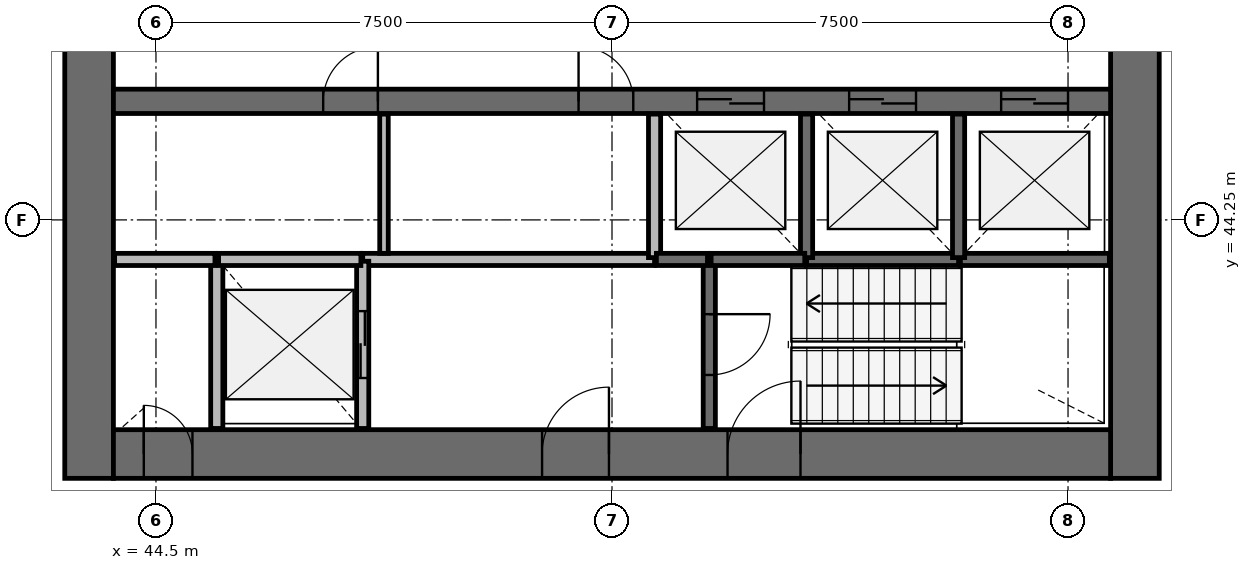
"""IFC4 building model, lengths in metres.
Left out: names, types, materials, properties, quantities, classifications, styles, units other than length and angle.
Written with IfcOpenShell. Run it as: python <this file> out.ifc"""

import sys

from ifc_helpers import new_model, si_unit, direction, frame, frame_2d, origin, place, context, subcontext, project, spatial, rectangle, extrude, source, transform, mapped, element, fill, save


model = new_model("IFC4")
c1 = context("Model", 3, precision=1e-05, world=origin(), true_north=direction((0.0, 1.0)))
c2 = subcontext(c1, "Body", "Model", "MODEL_VIEW")
j1 = project(units=[si_unit("LENGTHUNIT", "METRE"), si_unit("PLANEANGLEUNIT", "RADIAN")], contexts=[c1])
p1 = place(None, origin())
s1 = spatial("IfcSite", under=j1, at=p1, CompositionType="ELEMENT")
p2 = place(p1, origin())
s2 = spatial("IfcBuilding", under=s1, at=p2, CompositionType="ELEMENT")
p3 = place(p2, frame((0.0, 0.0, 144.8)))
s3 = spatial("IfcBuildingStorey", under=s2, at=p3, CompositionType="ELEMENT", Elevation=144.8)
p4 = place(p3, frame((60.6, 40.0, 0.0), z_axis=(0.0, 0.0, 1.0), x_axis=(0.0, 1.0, 0.0)))
e1 = element("IfcWall", 1, at=p4, inside=s3, PredefinedType="SHEAR", context=c2, shape_type="SweptSolid", body=[
    extrude(rectangle(XDim=16.0, YDim=0.8, at=frame_2d((8.0, 0.0))), origin(), (0.0, 0.0, 1.0), 3.9),
])
p5 = place(p4, frame((7.1, 0.0, 0.0)))
e2 = element("IfcOpeningElement", 2, at=p5, cuts=e1, PredefinedType="OPENING", context=c2, shape_type="SweptSolid", body=[
    extrude(rectangle(XDim=1.8, YDim=2.1, at=frame_2d((0.9, 1.05))), frame((0.0, 0.41, 0.0), z_axis=(0.0, -1.0, 0.0), x_axis=(1.0, 0.0, 0.0)), (0.0, 0.0, 1.0), 0.82),
])
p6 = place(p3, frame((43.4, 56.0, 0.0), z_axis=(0.0, 0.0, 1.0), x_axis=(0.0, -1.0, 0.0)))
e3 = element("IfcWall", 3, at=p6, inside=s3, PredefinedType="SHEAR", context=c2, shape_type="SweptSolid", body=[
    extrude(rectangle(XDim=16.0, YDim=0.8, at=frame_2d((8.0, 0.0))), origin(), (0.0, 0.0, 1.0), 3.9),
])
p7 = place(p6, frame((7.1, 0.0, 0.0)))
e4 = element("IfcOpeningElement", 4, at=p7, cuts=e3, PredefinedType="OPENING", context=c2, shape_type="SweptSolid", body=[
    extrude(rectangle(XDim=1.8, YDim=2.1, at=frame_2d((0.9, 1.05))), frame((0.0, 0.41, 0.0), z_axis=(0.0, -1.0, 0.0), x_axis=(1.0, 0.0, 0.0)), (0.0, 0.0, 1.0), 0.82),
])
p8 = place(p3, frame((43.8, 40.4, 0.0), z_axis=(0.0, 0.0, 1.0), x_axis=(1.0, 0.0, 0.0)))
e5 = element("IfcWall", 5, at=p8, inside=s3, PredefinedType="SHEAR", context=c2, shape_type="SweptSolid", body=[
    extrude(rectangle(XDim=16.4, YDim=0.8, at=frame_2d((8.2, 0.0))), origin(), (0.0, 0.0, 1.0), 3.9),
])
p9 = place(p8, frame((10.1, 0.0, 0.0)))
e6 = element("IfcOpeningElement", 6, at=p9, cuts=e5, PredefinedType="OPENING", context=c2, shape_type="SweptSolid", body=[
    extrude(rectangle(XDim=1.2, YDim=2.1, at=frame_2d((0.6, 1.05))), frame((0.0, 0.41, 0.0), z_axis=(0.0, -1.0, 0.0), x_axis=(1.0, 0.0, 0.0)), (0.0, 0.0, 1.0), 0.82),
])
p10 = place(p8, frame((7.05, 0.0, 0.0)))
e7 = element("IfcOpeningElement", 7, at=p10, cuts=e5, PredefinedType="OPENING", context=c2, shape_type="SweptSolid", body=[
    extrude(rectangle(XDim=1.1, YDim=2.1, at=frame_2d((0.55, 1.05))), frame((0.0, 0.41, 0.0), z_axis=(0.0, -1.0, 0.0), x_axis=(1.0, 0.0, 0.0)), (0.0, 0.0, 1.0), 0.82),
])
p11 = place(p8, frame((0.5, 0.0, 0.0)))
e8 = element("IfcOpeningElement", 8, at=p11, cuts=e5, PredefinedType="OPENING", context=c2, shape_type="SweptSolid", body=[
    extrude(rectangle(XDim=0.8, YDim=2.1, at=frame_2d((0.4, 1.05))), frame((0.0, 0.41, 0.0), z_axis=(0.0, -1.0, 0.0), x_axis=(1.0, 0.0, 0.0)), (0.0, 0.0, 1.0), 0.82),
])
p12 = place(p3, frame((43.8, 46.2, 0.0), z_axis=(0.0, 0.0, 1.0), x_axis=(1.0, 0.0, 0.0)))
e9 = element("IfcWall", 9, at=p12, inside=s3, PredefinedType="SHEAR", context=c2, shape_type="SweptSolid", body=[
    extrude(rectangle(XDim=16.4, YDim=0.4, at=frame_2d((8.2, 0.0))), origin(), (0.0, 0.0, 1.0), 3.9),
])
p13 = place(p12, frame((9.6, 0.0, 0.0)))
e10 = element("IfcOpeningElement", 10, at=p13, cuts=e9, PredefinedType="OPENING", context=c2, shape_type="SweptSolid", body=[
    extrude(rectangle(XDim=1.1, YDim=2.1, at=frame_2d((0.55, 1.05))), frame((0.0, 0.21, 0.0), z_axis=(0.0, -1.0, 0.0), x_axis=(1.0, 0.0, 0.0)), (0.0, 0.0, 1.0), 0.42),
])
p14 = place(p12, frame((12.1, 0.0, 0.0)))
e11 = element("IfcOpeningElement", 11, at=p14, cuts=e9, PredefinedType="OPENING", context=c2, shape_type="SweptSolid", body=[
    extrude(rectangle(XDim=1.1, YDim=2.1, at=frame_2d((0.55, 1.05))), frame((0.0, 0.21, 0.0), z_axis=(0.0, -1.0, 0.0), x_axis=(1.0, 0.0, 0.0)), (0.0, 0.0, 1.0), 0.42),
])
p15 = place(p12, frame((14.6, 0.0, 0.0)))
e12 = element("IfcOpeningElement", 12, at=p15, cuts=e9, PredefinedType="OPENING", context=c2, shape_type="SweptSolid", body=[
    extrude(rectangle(XDim=1.1, YDim=2.1, at=frame_2d((0.55, 1.05))), frame((0.0, 0.21, 0.0), z_axis=(0.0, -1.0, 0.0), x_axis=(1.0, 0.0, 0.0)), (0.0, 0.0, 1.0), 0.42),
])
p16 = place(p12, frame((3.45, 0.0, 0.0)))
e13 = element("IfcOpeningElement", 13, at=p16, cuts=e9, PredefinedType="OPENING", context=c2, shape_type="SweptSolid", body=[
    extrude(rectangle(XDim=0.9, YDim=2.1, at=frame_2d((0.45, 1.05))), frame((0.0, 0.21, 0.0), z_axis=(0.0, -1.0, 0.0), x_axis=(1.0, 0.0, 0.0)), (0.0, 0.0, 1.0), 0.42),
])
p17 = place(p12, frame((7.65, 0.0, 0.0)))
e14 = element("IfcOpeningElement", 14, at=p17, cuts=e9, PredefinedType="OPENING", context=c2, shape_type="SweptSolid", body=[
    extrude(rectangle(XDim=0.9, YDim=2.1, at=frame_2d((0.45, 1.05))), frame((0.0, 0.21, 0.0), z_axis=(0.0, -1.0, 0.0), x_axis=(1.0, 0.0, 0.0)), (0.0, 0.0, 1.0), 0.42),
])
p18 = place(p3, frame((52.7, 43.6, 0.0), z_axis=(0.0, 0.0, 1.0), x_axis=(-1.0, 0.0, 0.0)))
e15 = element("IfcWall", 15, at=p18, inside=s3, PredefinedType="SOLIDWALL", context=c2, shape_type="SweptSolid", body=[
    extrude(rectangle(XDim=4.8, YDim=0.2, at=frame_2d((2.4, 0.0))), origin(), (0.0, 0.0, 1.0), 3.58),
])
p19 = place(p3, frame((45.5, 43.6, 0.0), z_axis=(0.0, 0.0, 1.0), x_axis=(0.0, -1.0, 0.0)))
e16 = element("IfcWall", 16, at=p19, inside=s3, PredefinedType="SOLIDWALL", context=c2, shape_type="SweptSolid", body=[
    extrude(rectangle(XDim=2.78, YDim=0.2, at=frame_2d((1.39, 0.0))), origin(), (0.0, 0.0, 1.0), 3.58),
])
p20 = place(p3, frame((47.9, 40.82, 0.0), z_axis=(0.0, 0.0, 1.0), x_axis=(0.0, 1.0, 0.0)))
e17 = element("IfcWall", 17, at=p20, inside=s3, PredefinedType="SOLIDWALL", context=c2, shape_type="SweptSolid", body=[
    extrude(rectangle(XDim=2.75, YDim=0.2, at=frame_2d((1.375, 0.0))), origin(), (0.0, 0.0, 1.0), 3.58),
])
p21 = place(p20, frame((0.83, 0.0, 0.0)))
e18 = element("IfcOpeningElement", 18, at=p21, cuts=e17, PredefinedType="OPENING", context=c2, shape_type="SweptSolid", body=[
    extrude(rectangle(XDim=1.1, YDim=2.1, at=frame_2d((0.55, 1.05))), frame((0.0, 0.11, 0.0), z_axis=(0.0, -1.0, 0.0), x_axis=(1.0, 0.0, 0.0)), (0.0, 0.0, 1.0), 0.22),
])
p22 = place(p3, frame((53.6, 43.6, 0.0), z_axis=(0.0, 0.0, 1.0), x_axis=(0.0, -1.0, 0.0)))
e19 = element("IfcWall", 19, at=p22, inside=s3, PredefinedType="SOLIDWALL", context=c2, shape_type="SweptSolid", body=[
    extrude(rectangle(XDim=2.78, YDim=0.2, at=frame_2d((1.39, 0.0))), origin(), (0.0, 0.0, 1.0), 3.58),
])
p23 = place(p22, frame((0.9, 0.0, 0.0)))
e20 = element("IfcOpeningElement", 20, at=p23, cuts=e19, PredefinedType="OPENING", context=c2, shape_type="SweptSolid", body=[
    extrude(rectangle(XDim=1.0, YDim=2.1, at=frame_2d((0.5, 1.05))), frame((0.0, 0.11, 0.0), z_axis=(0.0, -1.0, 0.0), x_axis=(1.0, 0.0, 0.0)), (0.0, 0.0, 1.0), 0.22),
])
p24 = place(p3, frame((55.2, 43.6, 0.0), z_axis=(0.0, 0.0, 1.0), x_axis=(1.0, 0.0, 0.0)))
e21 = element("IfcWall", 21, at=p24, inside=s3, PredefinedType="SOLIDWALL", context=c2, shape_type="SweptSolid", body=[
    extrude(rectangle(XDim=2.5, YDim=0.2, at=frame_2d((1.25, 0.0))), origin(), (0.0, 0.0, 1.0), 3.58),
])
p25 = place(p3, frame((57.73, 43.6, 0.0), z_axis=(0.0, 0.0, 1.0), x_axis=(1.0, 0.0, 0.0)))
e22 = element("IfcWall", 22, at=p25, inside=s3, PredefinedType="SOLIDWALL", context=c2, shape_type="SweptSolid", body=[
    extrude(rectangle(XDim=2.45, YDim=0.2, at=frame_2d((1.225, 0.0))), origin(), (0.0, 0.0, 1.0), 3.58),
])
p26 = place(p3, frame((47.87, 43.6, 0.0), z_axis=(0.0, 0.0, 1.0), x_axis=(-1.0, 0.0, 0.0)))
e23 = element("IfcWall", 23, at=p26, inside=s3, PredefinedType="SOLIDWALL", context=c2, shape_type="SweptSolid", body=[
    extrude(rectangle(XDim=2.34, YDim=0.2, at=frame_2d((1.17, 0.0))), origin(), (0.0, 0.0, 1.0), 3.58),
])
for number, where, z_axis, x_axis in (
    (24, (52.7, 45.99, 0.0), (0.0, 0.0, 1.0), (0.0, -1.0, 0.0)),
    (25, (55.2, 43.63, 0.0), (0.0, 0.0, 1.0), (0.0, 1.0, 0.0)),
    (26, (57.7, 43.63, 0.0), (0.0, 0.0, 1.0), (0.0, 1.0, 0.0)),
):
    element("IfcWall", number, at=place(p3, frame(where, z_axis=z_axis, x_axis=x_axis)), inside=s3, PredefinedType="SOLIDWALL", context=c2, shape_type="SweptSolid", body=[
        extrude(rectangle(XDim=2.36, YDim=0.2, at=frame_2d((1.18, 0.0))), origin(), (0.0, 0.0, 1.0), 3.58),
    ])
p27 = place(p3, frame((45.47, 43.6, 0.0), z_axis=(0.0, 0.0, 1.0), x_axis=(-1.0, 0.0, 0.0)))
e27 = element("IfcWall", 27, at=p27, inside=s3, PredefinedType="SOLIDWALL", context=c2, shape_type="SweptSolid", body=[
    extrude(rectangle(XDim=1.65, YDim=0.2, at=frame_2d((0.825, 0.0))), origin(), (0.0, 0.0, 1.0), 3.58),
])
p28 = place(p3, frame((53.63, 43.6, 0.0), z_axis=(0.0, 0.0, 1.0), x_axis=(1.0, 0.0, 0.0)))
e28 = element("IfcWall", 28, at=p28, inside=s3, PredefinedType="SOLIDWALL", context=c2, shape_type="SweptSolid", body=[
    extrude(rectangle(XDim=1.54, YDim=0.2, at=frame_2d((0.77, 0.0))), origin(), (0.0, 0.0, 1.0), 3.58),
])
p29 = place(p3, frame((52.73, 43.6, 0.0), z_axis=(0.0, 0.0, 1.0), x_axis=(1.0, 0.0, 0.0)))
e29 = element("IfcWall", 29, at=p29, inside=s3, PredefinedType="SOLIDWALL", context=c2, shape_type="SweptSolid", body=[
    extrude(rectangle(XDim=0.84, YDim=0.2, at=frame_2d((0.42, 0.0))), origin(), (0.0, 0.0, 1.0), 3.58),
])
p30 = place(p3, frame((48.25, 43.7, 0.0), z_axis=(0.0, 0.0, 1.0), x_axis=(0.0, 1.0, 0.0)))
e30 = element("IfcWall", 30, at=p30, inside=s3, PredefinedType="PARTITIONING", context=c2, shape_type="SweptSolid", body=[
    extrude(rectangle(XDim=2.29, YDim=0.14, at=frame_2d((1.145, 0.0))), origin(), (0.0, 0.0, 1.0), 2.88),
])
m1 = source(origin(), c2, "Body", "SweptSolid", [
    extrude(rectangle(XDim=1.1, YDim=2.1, at=frame_2d((0.55, 1.05))), frame((0.0, 0.025, 0.0), z_axis=(0.0, -1.0, 0.0), x_axis=(1.0, 0.0, 0.0)), (0.0, 0.0, 1.0), 0.05),
])
p31 = place(p13, origin())
e31 = element("IfcDoor", 31, at=p31, inside=s3, OperationType="DOUBLE_DOOR_SLIDING", PredefinedType="USERDEFINED", context=c2, shape_type="MappedRepresentation", body=[
    mapped(m1, transform((0.0, 0.0, 0.0), scale=1.0)),
])
fill(e10, e31)
p32 = place(p14, origin())
e32 = element("IfcDoor", 32, at=p32, inside=s3, OperationType="DOUBLE_DOOR_SLIDING", PredefinedType="USERDEFINED", context=c2, shape_type="MappedRepresentation", body=[
    mapped(m1, transform((0.0, 0.0, 0.0), scale=1.0)),
])
fill(e11, e32)
p33 = place(p15, origin())
e33 = element("IfcDoor", 33, at=p33, inside=s3, OperationType="DOUBLE_DOOR_SLIDING", PredefinedType="USERDEFINED", context=c2, shape_type="MappedRepresentation", body=[
    mapped(m1, transform((0.0, 0.0, 0.0), scale=1.0)),
])
fill(e12, e33)
p34 = place(p21, origin())
e34 = element("IfcDoor", 34, at=p34, inside=s3, OperationType="DOUBLE_DOOR_SLIDING", PredefinedType="USERDEFINED", context=c2, shape_type="MappedRepresentation", body=[
    mapped(m1, transform((0.0, 0.0, 0.0), scale=1.0)),
])
fill(e18, e34)
m2 = source(origin(), c2, "Body", "SweptSolid", [
    extrude(rectangle(XDim=1.2, YDim=2.1, at=frame_2d((0.6, 1.05))), frame((0.0, 0.025, 0.0), z_axis=(0.0, -1.0, 0.0), x_axis=(1.0, 0.0, 0.0)), (0.0, 0.0, 1.0), 0.05),
])
p35 = place(p9, origin())
e35 = element("IfcDoor", 35, at=p35, inside=s3, OperationType="SINGLE_SWING_RIGHT", PredefinedType="DOOR", context=c2, shape_type="MappedRepresentation", body=[
    mapped(m2, transform((0.0, 0.0, 0.0), scale=1.0)),
])
fill(e6, e35)
m3 = source(origin(), c2, "Body", "SweptSolid", [
    extrude(rectangle(XDim=1.0, YDim=2.1, at=frame_2d((0.5, 1.05))), frame((0.0, 0.025, 0.0), z_axis=(0.0, -1.0, 0.0), x_axis=(1.0, 0.0, 0.0)), (0.0, 0.0, 1.0), 0.05),
])
p36 = place(p23, origin())
e36 = element("IfcDoor", 36, at=p36, inside=s3, OperationType="SINGLE_SWING_LEFT", PredefinedType="DOOR", context=c2, shape_type="MappedRepresentation", body=[
    mapped(m3, transform((0.0, 0.0, 0.0), scale=1.0)),
])
fill(e20, e36)
m4 = source(origin(), c2, "Body", "SweptSolid", [
    extrude(rectangle(XDim=1.1, YDim=2.1, at=frame_2d((0.55, 1.05))), frame((0.0, 0.025, 0.0), z_axis=(0.0, -1.0, 0.0), x_axis=(1.0, 0.0, 0.0)), (0.0, 0.0, 1.0), 0.05),
])
p37 = place(p10, origin())
e37 = element("IfcDoor", 37, at=p37, inside=s3, OperationType="SINGLE_SWING_RIGHT", PredefinedType="DOOR", context=c2, shape_type="MappedRepresentation", body=[
    mapped(m4, transform((0.0, 0.0, 0.0), scale=1.0)),
])
fill(e7, e37)
m5 = source(origin(), c2, "Body", "SweptSolid", [
    extrude(rectangle(XDim=0.8, YDim=2.1, at=frame_2d((0.4, 1.05))), frame((0.0, 0.025, 0.0), z_axis=(0.0, -1.0, 0.0), x_axis=(1.0, 0.0, 0.0)), (0.0, 0.0, 1.0), 0.05),
])
p38 = place(p11, origin())
e38 = element("IfcDoor", 38, at=p38, inside=s3, OperationType="SINGLE_SWING_LEFT", PredefinedType="DOOR", context=c2, shape_type="MappedRepresentation", body=[
    mapped(m5, transform((0.0, 0.0, 0.0), scale=1.0)),
])
fill(e8, e38)
m6 = source(origin(), c2, "Body", "SweptSolid", [
    extrude(rectangle(XDim=0.9, YDim=2.1, at=frame_2d((0.45, 1.05))), frame((0.0, 0.025, 0.0), z_axis=(0.0, -1.0, 0.0), x_axis=(1.0, 0.0, 0.0)), (0.0, 0.0, 1.0), 0.05),
])
p39 = place(p16, origin())
e39 = element("IfcDoor", 39, at=p39, inside=s3, OperationType="SINGLE_SWING_RIGHT", PredefinedType="DOOR", context=c2, shape_type="MappedRepresentation", body=[
    mapped(m6, transform((0.0, 0.0, 0.0), scale=1.0)),
])
fill(e13, e39)
p40 = place(p17, origin())
e40 = element("IfcDoor", 40, at=p40, inside=s3, OperationType="SINGLE_SWING_LEFT", PredefinedType="DOOR", context=c2, shape_type="MappedRepresentation", body=[
    mapped(m6, transform((0.0, 0.0, 0.0), scale=1.0)),
])
fill(e14, e40)
save(model, sys.argv[1])
